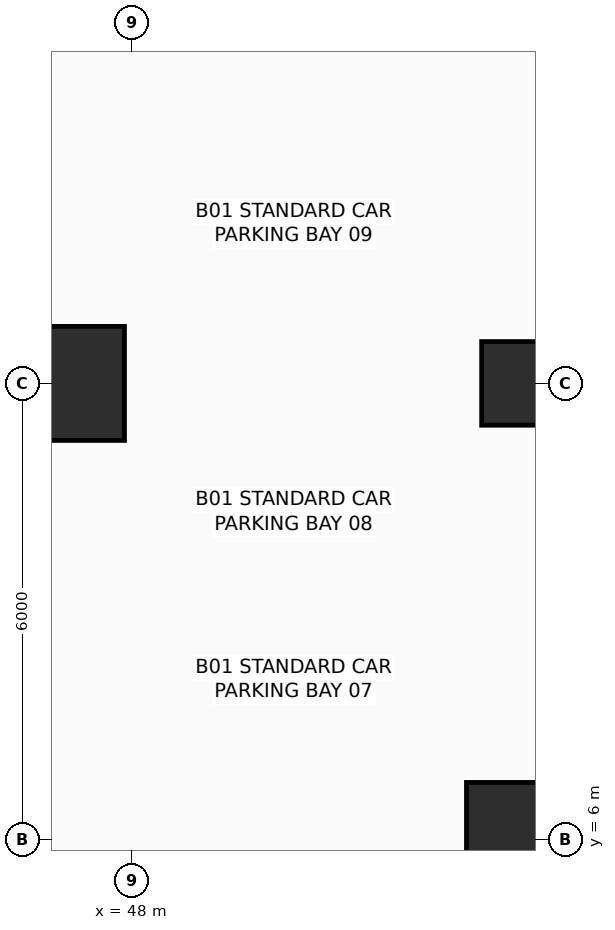
"""IFC4 building model, lengths in metres.
Left out: names, types, materials, properties, quantities, classifications, styles, units other than length and angle.
Written with IfcOpenShell. Run it as: python <this file> out.ifc"""

import sys

from ifc_helpers import new_model, si_unit, direction, frame, origin, origin_2d, place, context, subcontext, project, spatial, rectangle, extrude, element, save


model = new_model("IFC4")
c1 = context("Model", 3, precision=1e-05, world=origin(), true_north=direction((0.0, 1.0)))
c2 = subcontext(c1, "Body", "Model", "MODEL_VIEW")
j1 = project(units=[si_unit("LENGTHUNIT", "METRE"), si_unit("PLANEANGLEUNIT", "RADIAN")], contexts=[c1])
p1 = place(None, origin())
s1 = spatial("IfcSite", under=j1, at=p1, CompositionType="ELEMENT")
p2 = place(p1, origin())
s2 = spatial("IfcBuilding", under=s1, at=p2, CompositionType="ELEMENT")
p3 = place(p2, frame((0.0, 0.0, -4.8)))
s3 = spatial("IfcBuildingStorey", under=s2, at=p3, CompositionType="ELEMENT", Elevation=-4.8)
for number, where, z_axis, x_axis in (
    (1, (47.15, 12.0, 0.0), (0.0, 0.0, 1.0), (1.0, 0.0, 0.0)),
    (2, (53.15, 6.0, 0.0), (0.0, 0.0, 1.0), (1.0, 0.0, 0.0)),
):
    element("IfcColumn", number, at=place(p3, frame(where, z_axis=z_axis, x_axis=x_axis)), inside=s3, PredefinedType="COLUMN", context=c2, shape_type="SweptSolid", body=[
        extrude(rectangle(XDim=1.5, YDim=1.5, at=origin_2d()), origin(), (0.0, 0.0, 1.0), 4.8),
    ])
p4 = place(p3, frame((53.15, 12.0, 0.0), z_axis=(0.0, 0.0, 1.0), x_axis=(1.0, 0.0, 0.0)))
e3 = element("IfcColumn", 3, at=p4, inside=s3, PredefinedType="COLUMN", context=c2, shape_type="SweptSolid", body=[
    extrude(rectangle(XDim=1.1, YDim=1.1, at=origin_2d()), origin(), (0.0, 0.0, 1.0), 4.8),
])
save(model, sys.argv[1])
